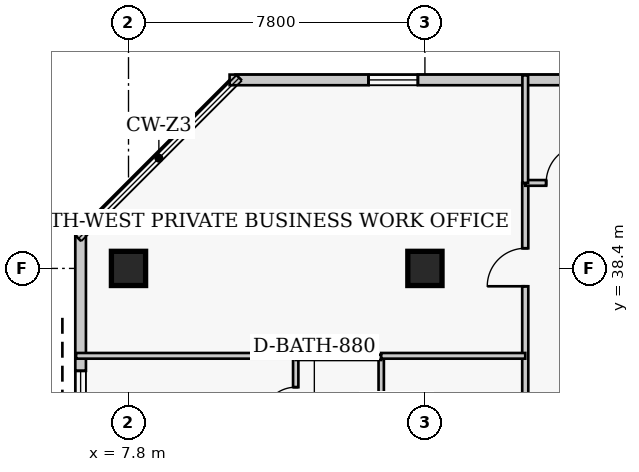
"""IFC4 building model, lengths in metres.
Left out: names, types, materials, properties, quantities, classifications, styles, units other than length and angle.
Written with IfcOpenShell. Run it as: python <this file> out.ifc"""

import sys

from ifc_helpers import new_model, si_unit, direction, frame, frame_2d, origin, origin_2d, place, context, subcontext, project, spatial, rectangle, extrude, element, fill, save


model = new_model("IFC4")
c1 = context("Model", 3, precision=1e-05, world=origin(), true_north=direction((0.0, 1.0)))
c2 = subcontext(c1, "Body", "Model", "MODEL_VIEW")
j1 = project(units=[si_unit("LENGTHUNIT", "METRE"), si_unit("PLANEANGLEUNIT", "RADIAN")], contexts=[c1])
p1 = place(None, origin())
s1 = spatial("IfcSite", under=j1, at=p1, CompositionType="ELEMENT")
p2 = place(p1, origin())
s2 = spatial("IfcBuilding", under=s1, at=p2, CompositionType="ELEMENT")
p3 = place(p2, frame((0.0, 0.0, 196.8)))
s3 = spatial("IfcBuildingStorey", under=s2, at=p3, CompositionType="ELEMENT", Elevation=196.8)
for number, where, z_axis, x_axis in (
    (1, (7.8, 38.4, 0.0), (0.0, 0.0, 1.0), (1.0, 0.0, 0.0)),
    (2, (15.6, 38.4, 0.0), (0.0, 0.0, 1.0), (1.0, 0.0, 0.0)),
):
    element("IfcColumn", number, at=place(p3, frame(where, z_axis=z_axis, x_axis=x_axis)), inside=s3, PredefinedType="COLUMN", context=c2, shape_type="SweptSolid", body=[
        extrude(rectangle(XDim=0.9, YDim=0.9, at=origin_2d()), origin(), (0.0, 0.0, 1.0), 3.9),
    ])
p4 = place(p3, frame((36.29, 43.36, 0.0), z_axis=(0.0, 0.0, 1.0), x_axis=(-1.0, 0.0, 0.0)))
e3 = element("IfcWall", 3, at=p4, inside=s3, PredefinedType="SOLIDWALL", context=c2, shape_type="SweptSolid", body=[
    extrude(rectangle(XDim=25.83, YDim=0.28, at=frame_2d((12.915, 0.0))), origin(), (0.0, 0.0, 1.0), 3.65),
])
p5 = place(p4, frame((3.005, 0.0, 0.85)))
e4 = element("IfcOpeningElement", 4, at=p5, cuts=e3, PredefinedType="OPENING", context=c2, shape_type="SweptSolid", body=[
    extrude(rectangle(XDim=1.3, YDim=1.7, at=frame_2d((0.65, 0.85))), frame((0.0, 0.15, 0.0), z_axis=(0.0, -1.0, 0.0), x_axis=(1.0, 0.0, 0.0)), (0.0, 0.0, 1.0), 0.3),
])
p6 = place(p4, frame((12.265, 0.0, 0.85)))
e5 = element("IfcOpeningElement", 5, at=p6, cuts=e3, PredefinedType="OPENING", context=c2, shape_type="SweptSolid", body=[
    extrude(rectangle(XDim=1.3, YDim=1.7, at=frame_2d((0.65, 0.85))), frame((0.0, 0.15, 0.0), z_axis=(0.0, -1.0, 0.0), x_axis=(1.0, 0.0, 0.0)), (0.0, 0.0, 1.0), 0.3),
])
p7 = place(p4, frame((20.875, 0.0, 0.85)))
e6 = element("IfcOpeningElement", 6, at=p7, cuts=e3, PredefinedType="OPENING", context=c2, shape_type="SweptSolid", body=[
    extrude(rectangle(XDim=1.3, YDim=1.7, at=frame_2d((0.65, 0.85))), frame((0.0, 0.15, 0.0), z_axis=(0.0, -1.0, 0.0), x_axis=(1.0, 0.0, 0.0)), (0.0, 0.0, 1.0), 0.3),
])
p8 = place(p3, frame((6.54, 39.44, 0.0), z_axis=(0.0, 0.0, 1.0), x_axis=(0.0, -1.0, 0.0)))
e7 = element("IfcWall", 7, at=p8, inside=s3, PredefinedType="SOLIDWALL", context=c2, shape_type="SweptSolid", body=[
    extrude(rectangle(XDim=29.88, YDim=0.28, at=frame_2d((14.94, 0.0))), origin(), (0.0, 0.0, 1.0), 3.65),
])
p9 = place(p8, frame((3.735, 0.0, 0.85)))
e8 = element("IfcOpeningElement", 8, at=p9, cuts=e7, PredefinedType="OPENING", context=c2, shape_type="SweptSolid", body=[
    extrude(rectangle(XDim=1.3, YDim=1.7, at=frame_2d((0.65, 0.85))), frame((0.0, 0.15, 0.0), z_axis=(0.0, -1.0, 0.0), x_axis=(1.0, 0.0, 0.0)), (0.0, 0.0, 1.0), 0.3),
])
p10 = place(p8, frame((11.205, 0.0, 0.85)))
e9 = element("IfcOpeningElement", 9, at=p10, cuts=e7, PredefinedType="OPENING", context=c2, shape_type="SweptSolid", body=[
    extrude(rectangle(XDim=1.3, YDim=1.7, at=frame_2d((0.65, 0.85))), frame((0.0, 0.15, 0.0), z_axis=(0.0, -1.0, 0.0), x_axis=(1.0, 0.0, 0.0)), (0.0, 0.0, 1.0), 0.3),
])
p11 = place(p8, frame((17.375, 0.0, 0.85)))
e10 = element("IfcOpeningElement", 10, at=p11, cuts=e7, PredefinedType="OPENING", context=c2, shape_type="SweptSolid", body=[
    extrude(rectangle(XDim=1.3, YDim=1.7, at=frame_2d((0.65, 0.85))), frame((0.0, 0.15, 0.0), z_axis=(0.0, -1.0, 0.0), x_axis=(1.0, 0.0, 0.0)), (0.0, 0.0, 1.0), 0.3),
])
p12 = place(p8, frame((25.495, 0.0, 0.85)))
e11 = element("IfcOpeningElement", 11, at=p12, cuts=e7, PredefinedType="OPENING", context=c2, shape_type="SweptSolid", body=[
    extrude(rectangle(XDim=1.3, YDim=1.7, at=frame_2d((0.65, 0.85))), frame((0.0, 0.15, 0.0), z_axis=(0.0, -1.0, 0.0), x_axis=(1.0, 0.0, 0.0)), (0.0, 0.0, 1.0), 0.3),
])
p13 = place(p3, frame((18.24, 7.55, 0.0), z_axis=(0.0, 0.0, 1.0), x_axis=(0.0, 1.0, 0.0)))
e12 = element("IfcWall", 12, at=p13, inside=s3, PredefinedType="PARTITIONING", context=c2, shape_type="SweptSolid", body=[
    extrude(rectangle(XDim=33.1, YDim=0.16, at=frame_2d((16.55, 0.0))), origin(), (0.0, 0.0, 1.0), 3.65),
])
p14 = place(p13, frame((1.35, 0.0, 0.0)))
e13 = element("IfcOpeningElement", 13, at=p14, cuts=e12, PredefinedType="OPENING", context=c2, shape_type="SweptSolid", body=[
    extrude(rectangle(XDim=0.95, YDim=2.1, at=frame_2d((0.475, 1.05))), frame((0.0, 0.09, 0.0), z_axis=(0.0, -1.0, 0.0), x_axis=(1.0, 0.0, 0.0)), (0.0, 0.0, 1.0), 0.18),
])
p15 = place(p13, frame((7.575, 0.0, 0.0)))
e14 = element("IfcOpeningElement", 14, at=p15, cuts=e12, PredefinedType="OPENING", context=c2, shape_type="SweptSolid", body=[
    extrude(rectangle(XDim=0.95, YDim=2.1, at=frame_2d((0.475, 1.05))), frame((0.0, 0.09, 0.0), z_axis=(0.0, -1.0, 0.0), x_axis=(1.0, 0.0, 0.0)), (0.0, 0.0, 1.0), 0.18),
])
p16 = place(p13, frame((20.025, 0.0, 0.0)))
e15 = element("IfcOpeningElement", 15, at=p16, cuts=e12, PredefinedType="OPENING", context=c2, shape_type="SweptSolid", body=[
    extrude(rectangle(XDim=0.95, YDim=2.1, at=frame_2d((0.475, 1.05))), frame((0.0, 0.09, 0.0), z_axis=(0.0, -1.0, 0.0), x_axis=(1.0, 0.0, 0.0)), (0.0, 0.0, 1.0), 0.18),
])
p17 = place(p13, frame((30.38, 0.0, 0.0)))
e16 = element("IfcOpeningElement", 16, at=p17, cuts=e12, PredefinedType="OPENING", context=c2, shape_type="SweptSolid", body=[
    extrude(rectangle(XDim=1.0, YDim=2.15, at=frame_2d((0.5, 1.075))), frame((0.0, 0.09, 0.0), z_axis=(0.0, -1.0, 0.0), x_axis=(1.0, 0.0, 0.0)), (0.0, 0.0, 1.0), 0.18),
])
p18 = place(p3, frame((18.24, 40.65, 0.0), z_axis=(0.0, 0.0, 1.0), x_axis=(1.0, 0.0, 0.0)))
e17 = element("IfcWall", 17, at=p18, inside=s3, PredefinedType="PARTITIONING", context=c2, shape_type="SweptSolid", body=[
    extrude(rectangle(XDim=3.86, YDim=0.15, at=frame_2d((1.93, 0.0))), origin(), (0.0, 0.0, 1.0), 3.65),
])
p19 = place(p18, frame((0.55, 0.0, 0.0)))
e18 = element("IfcOpeningElement", 18, at=p19, cuts=e17, PredefinedType="OPENING", context=c2, shape_type="SweptSolid", body=[
    extrude(rectangle(XDim=1.0, YDim=2.15, at=frame_2d((0.5, 1.075))), frame((0.0, 0.085, 0.0), z_axis=(0.0, -1.0, 0.0), x_axis=(1.0, 0.0, 0.0)), (0.0, 0.0, 1.0), 0.17),
])
p20 = place(p3, frame((18.24, 40.65, 0.0), z_axis=(0.0, 0.0, 1.0), x_axis=(0.0, 1.0, 0.0)))
e19 = element("IfcWall", 19, at=p20, inside=s3, PredefinedType="PARTITIONING", context=c2, shape_type="SweptSolid", body=[
    extrude(rectangle(XDim=2.83, YDim=0.15, at=frame_2d((1.415, 0.0))), origin(), (0.0, 0.0, 1.0), 3.65),
])
p21 = place(p3, frame((12.2, 33.61, 0.0), z_axis=(0.0, 0.0, 1.0), x_axis=(0.0, 1.0, 0.0)))
e20 = element("IfcWall", 20, at=p21, inside=s3, PredefinedType="PLUMBINGWALL", context=c2, shape_type="SweptSolid", body=[
    extrude(rectangle(XDim=2.45, YDim=0.14, at=frame_2d((1.225, 0.0))), origin(), (0.0, 0.0, 1.0), 3.65),
])
p22 = place(p21, frame((0.785, 0.0, 0.0)))
e21 = element("IfcOpeningElement", 21, at=p22, cuts=e20, PredefinedType="OPENING", context=c2, shape_type="SweptSolid", body=[
    extrude(rectangle(XDim=0.88, YDim=2.05, at=frame_2d((0.44, 1.025))), frame((0.0, 0.08, 0.0), z_axis=(0.0, -1.0, 0.0), x_axis=(1.0, 0.0, 0.0)), (0.0, 0.0, 1.0), 0.16),
])
p23 = place(p3, frame((14.45, 33.61, 0.0), z_axis=(0.0, 0.0, 1.0), x_axis=(0.0, 1.0, 0.0)))
e22 = element("IfcWall", 22, at=p23, inside=s3, PredefinedType="PLUMBINGWALL", context=c2, shape_type="SweptSolid", body=[
    extrude(rectangle(XDim=2.45, YDim=0.14, at=frame_2d((1.225, 0.0))), origin(), (0.0, 0.0, 1.0), 3.65),
])
p24 = place(p3, frame((12.2, 36.06, 0.0), z_axis=(0.0, 0.0, 1.0), x_axis=(1.0, 0.0, 0.0)))
e23 = element("IfcWall", 23, at=p24, inside=s3, PredefinedType="PLUMBINGWALL", context=c2, shape_type="SweptSolid", body=[
    extrude(rectangle(XDim=2.25, YDim=0.14, at=frame_2d((1.125, 0.0))), origin(), (0.0, 0.0, 1.0), 3.65),
])
p25 = place(p3, frame((6.42, 36.1, 0.0), z_axis=(0.0, 0.0, 1.0), x_axis=(1.0, 0.0, 0.0)))
e24 = element("IfcWall", 24, at=p25, inside=s3, PredefinedType="PARTITIONING", context=c2, shape_type="SweptSolid", body=[
    extrude(rectangle(XDim=5.78, YDim=0.15, at=frame_2d((2.89, 0.0))), origin(), (0.0, 0.0, 1.0), 3.65),
])
p26 = place(p3, frame((14.45, 36.1, 0.0), z_axis=(0.0, 0.0, 1.0), x_axis=(1.0, 0.0, 0.0)))
e25 = element("IfcWall", 25, at=p26, inside=s3, PredefinedType="PARTITIONING", context=c2, shape_type="SweptSolid", body=[
    extrude(rectangle(XDim=3.79, YDim=0.15, at=frame_2d((1.895, 0.0))), origin(), (0.0, 0.0, 1.0), 3.65),
])
p27 = place(p7, origin())
e26 = element("IfcWindow", 26, at=p27, inside=s3, PartitioningType="SINGLE_PANEL", PredefinedType="WINDOW", context=c2, shape_type="SweptSolid", body=[
    extrude(rectangle(XDim=1.3, YDim=1.7, at=frame_2d((0.65, 0.85))), frame((0.0, 0.03, 0.0), z_axis=(0.0, -1.0, 0.0), x_axis=(1.0, 0.0, 0.0)), (0.0, 0.0, 1.0), 0.06),
])
fill(e6, e26)
p28 = place(p9, origin())
e27 = element("IfcWindow", 27, at=p28, inside=s3, PartitioningType="SINGLE_PANEL", PredefinedType="WINDOW", context=c2, shape_type="SweptSolid", body=[
    extrude(rectangle(XDim=1.3, YDim=1.7, at=frame_2d((0.65, 0.85))), frame((0.0, 0.03, 0.0), z_axis=(0.0, -1.0, 0.0), x_axis=(1.0, 0.0, 0.0)), (0.0, 0.0, 1.0), 0.06),
])
fill(e8, e27)
p29 = place(p19, origin())
e28 = element("IfcDoor", 28, at=p29, inside=s3, OperationType="SINGLE_SWING_RIGHT", PredefinedType="DOOR", context=c2, shape_type="SweptSolid", body=[
    extrude(rectangle(XDim=1.0, YDim=2.15, at=frame_2d((0.5, 1.075))), frame((0.0, 0.025, 0.0), z_axis=(0.0, -1.0, 0.0), x_axis=(1.0, 0.0, 0.0)), (0.0, 0.0, 1.0), 0.05),
])
fill(e18, e28)
p30 = place(p22, origin())
e29 = element("IfcDoor", 29, at=p30, inside=s3, OperationType="SINGLE_SWING_LEFT", PredefinedType="DOOR", context=c2, shape_type="SweptSolid", body=[
    extrude(rectangle(XDim=0.88, YDim=2.05, at=frame_2d((0.44, 1.025))), frame((0.0, 0.025, 0.0), z_axis=(0.0, -1.0, 0.0), x_axis=(1.0, 0.0, 0.0)), (0.0, 0.0, 1.0), 0.05),
])
fill(e21, e29)
p31 = place(p17, origin())
e30 = element("IfcDoor", 30, at=p31, inside=s3, OperationType="SINGLE_SWING_LEFT", PredefinedType="DOOR", context=c2, shape_type="SweptSolid", body=[
    extrude(rectangle(XDim=1.0, YDim=2.15, at=frame_2d((0.5, 1.075))), frame((0.0, 0.025, 0.0), z_axis=(0.0, -1.0, 0.0), x_axis=(1.0, 0.0, 0.0)), (0.0, 0.0, 1.0), 0.05),
])
fill(e16, e30)
save(model, sys.argv[1])
